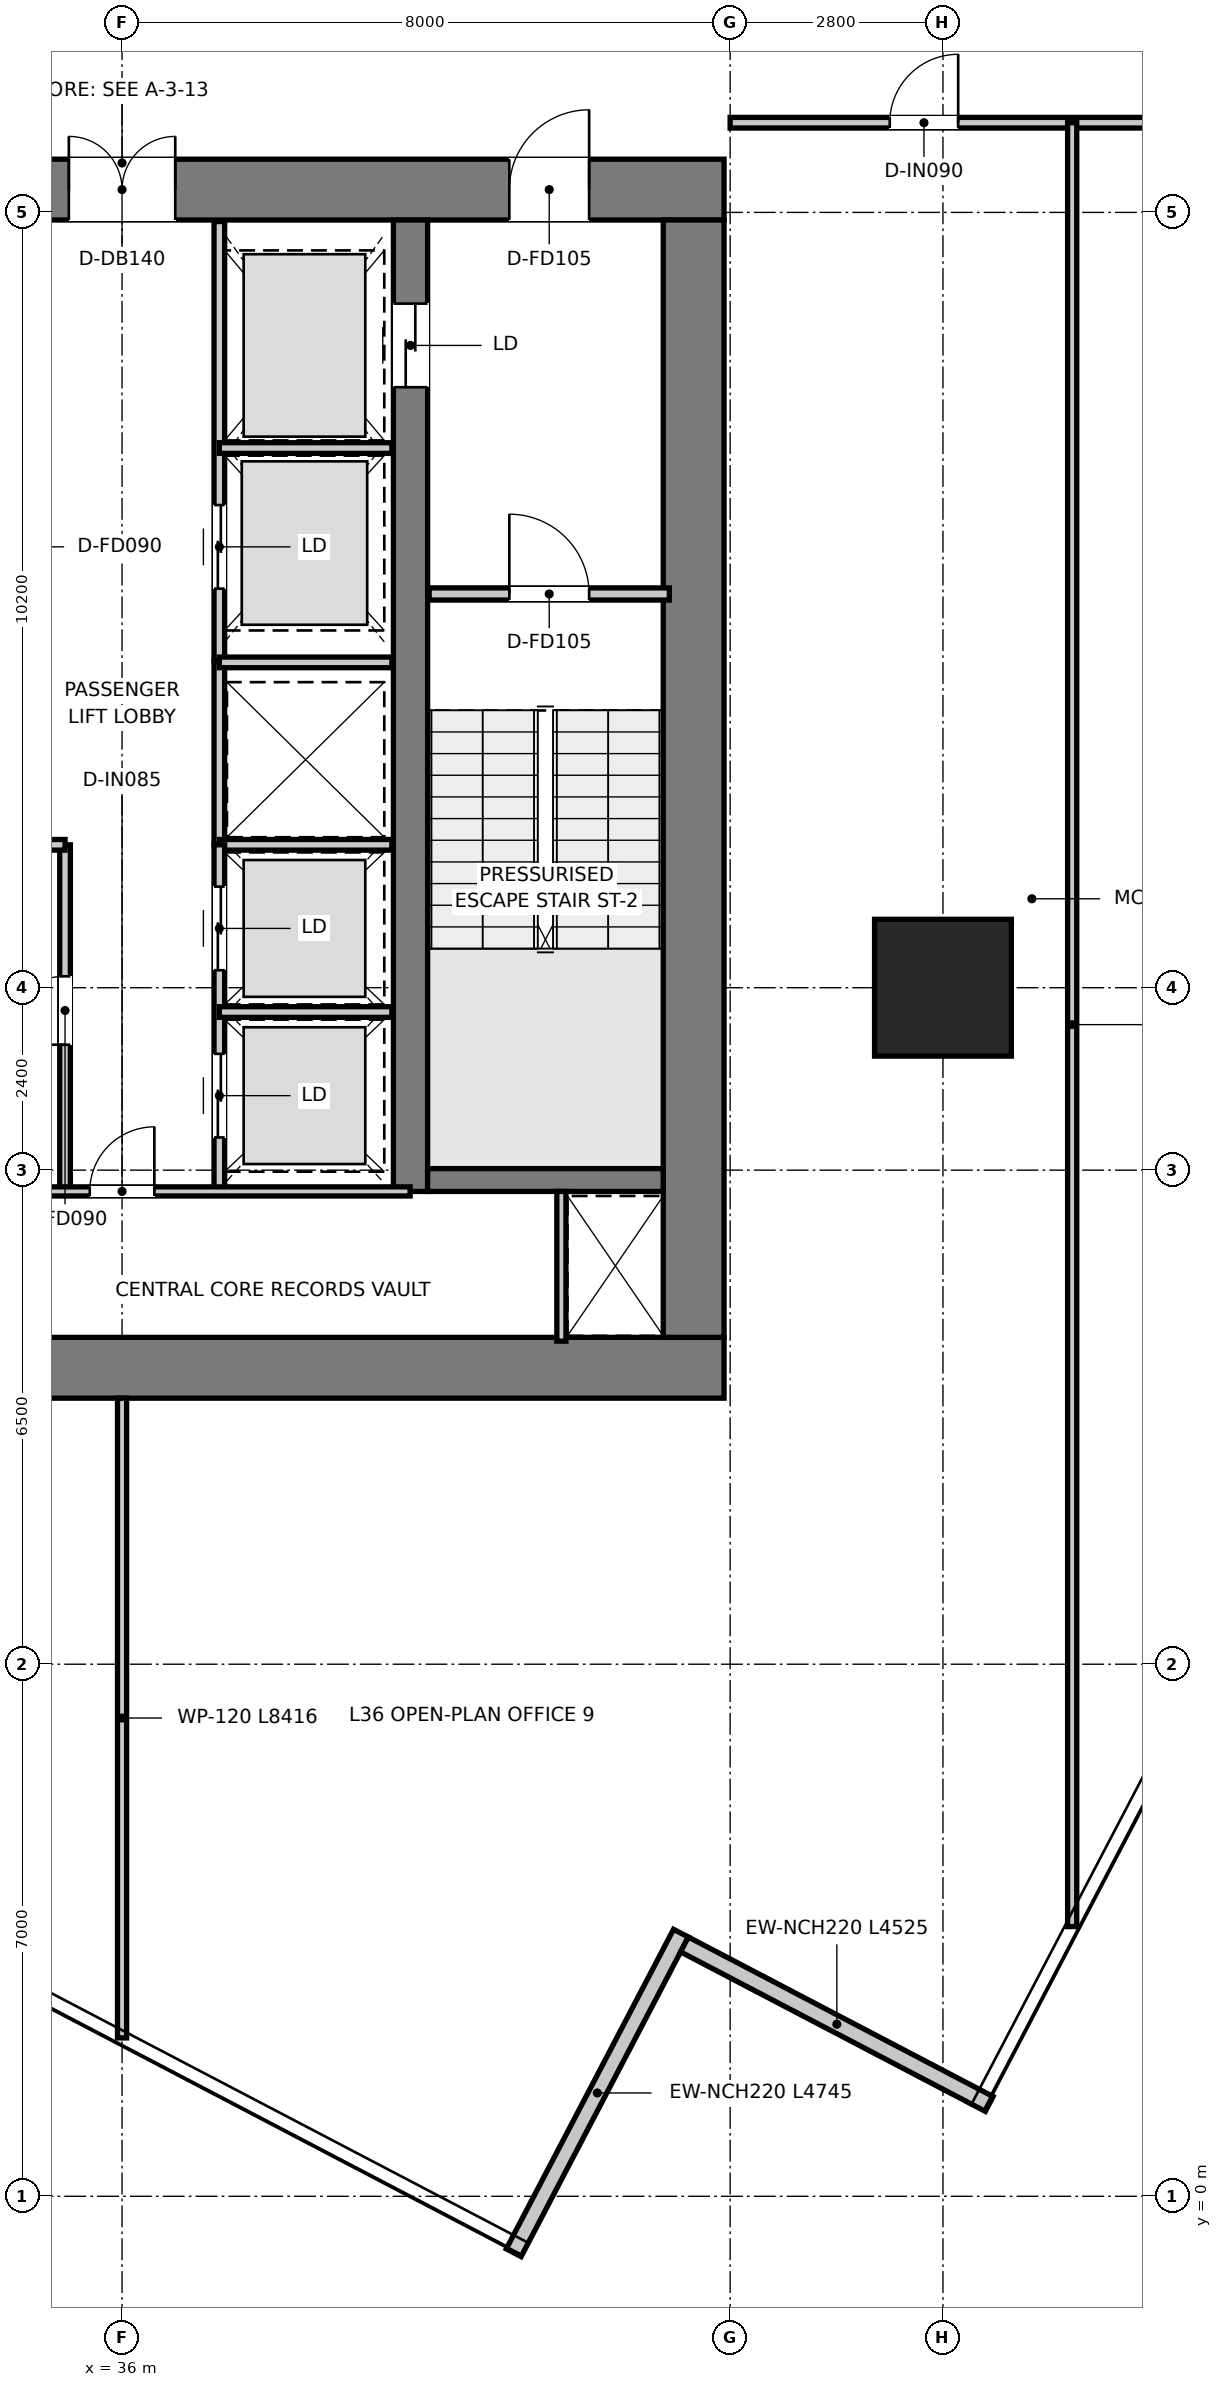
"""IFC4 building model, lengths in metres.
Left out: names, types, materials, properties, quantities, classifications, styles, units other than length and angle.
Written with IfcOpenShell. Run it as: python <this file> out.ifc"""

import sys

from ifc_helpers import new_model, si_unit, direction, frame, frame_2d, origin, origin_2d, place, context, subcontext, project, spatial, rectangle, extrude, source, transform, mapped, element, fill, save


model = new_model("IFC4")
c1 = context("Model", 3, precision=1e-05, world=origin(), true_north=direction((0.0, 1.0)))
c2 = subcontext(c1, "Body", "Model", "MODEL_VIEW")
j1 = project(units=[si_unit("LENGTHUNIT", "METRE"), si_unit("PLANEANGLEUNIT", "RADIAN")], contexts=[c1])
p1 = place(None, origin())
s1 = spatial("IfcSite", under=j1, at=p1, CompositionType="ELEMENT")
p2 = place(p1, origin())
s2 = spatial("IfcBuilding", under=s1, at=p2, CompositionType="ELEMENT")
p3 = place(p2, frame((0.0, 0.0, 150.15)))
s3 = spatial("IfcBuildingStorey", under=s2, at=p3, CompositionType="ELEMENT", Elevation=150.15)
p4 = place(p3, frame((28.08, 10.9, 0.0), z_axis=(0.0, 0.0, 1.0), x_axis=(1.0, 0.0, 0.0)))
e1 = element("IfcWall", 1, at=p4, inside=s3, PredefinedType="SHEAR", context=c2, shape_type="SweptSolid", body=[
    extrude(rectangle(XDim=15.84, YDim=0.8, at=frame_2d((7.92, 0.0))), origin(), (0.0, 0.0, 1.0), 3.95),
])
p5 = place(p3, frame((28.08, 26.4, 0.0), z_axis=(0.0, 0.0, 1.0), x_axis=(1.0, 0.0, 0.0)))
e2 = element("IfcWall", 2, at=p5, inside=s3, PredefinedType="SHEAR", context=c2, shape_type="SweptSolid", body=[
    extrude(rectangle(XDim=15.84, YDim=0.8, at=frame_2d((7.92, 0.0))), origin(), (0.0, 0.0, 1.0), 3.95),
])
p6 = place(p5, frame((7.22, 0.0, 0.0)))
e3 = element("IfcOpeningElement", 3, at=p6, cuts=e2, PredefinedType="OPENING", context=c2, shape_type="SweptSolid", body=[
    extrude(rectangle(XDim=1.4, YDim=2.2, at=frame_2d((0.7, 1.1))), frame((0.0, 0.41, 0.0), z_axis=(0.0, -1.0, 0.0), x_axis=(1.0, 0.0, 0.0)), (0.0, 0.0, 1.0), 0.82),
])
p7 = place(p5, frame((1.775, 0.0, 0.0)))
e4 = element("IfcOpeningElement", 4, at=p7, cuts=e2, PredefinedType="OPENING", context=c2, shape_type="SweptSolid", body=[
    extrude(rectangle(XDim=1.05, YDim=2.1, at=frame_2d((0.525, 1.05))), frame((0.0, 0.41, 0.0), z_axis=(0.0, -1.0, 0.0), x_axis=(1.0, 0.0, 0.0)), (0.0, 0.0, 1.0), 0.82),
])
p8 = place(p5, frame((13.015, 0.0, 0.0)))
e5 = element("IfcOpeningElement", 5, at=p8, cuts=e2, PredefinedType="OPENING", context=c2, shape_type="SweptSolid", body=[
    extrude(rectangle(XDim=1.05, YDim=2.1, at=frame_2d((0.525, 1.05))), frame((0.0, 0.41, 0.0), z_axis=(0.0, -1.0, 0.0), x_axis=(1.0, 0.0, 0.0)), (0.0, 0.0, 1.0), 0.82),
])
p9 = place(p3, frame((43.52, 11.3, 0.0), z_axis=(0.0, 0.0, 1.0), x_axis=(0.0, 1.0, 0.0)))
e6 = element("IfcWall", 6, at=p9, inside=s3, PredefinedType="SHEAR", context=c2, shape_type="SweptSolid", body=[
    extrude(rectangle(XDim=14.7, YDim=0.8, at=frame_2d((7.35, 0.0))), origin(), (0.0, 0.0, 1.0), 3.95),
])
p10 = place(p3, frame((39.795, 13.22, 0.0), z_axis=(0.0, 0.0, 1.0), x_axis=(0.0, 1.0, 0.0)))
e7 = element("IfcWall", 7, at=p10, inside=s3, PredefinedType="SHEAR", context=c2, shape_type="SweptSolid", body=[
    extrude(rectangle(XDim=12.78, YDim=0.45, at=frame_2d((6.39, 0.0))), origin(), (0.0, 0.0, 1.0), 3.95),
])
p11 = place(p10, frame((10.58, 0.0, 0.0)))
e8 = element("IfcOpeningElement", 8, at=p11, cuts=e7, PredefinedType="OPENING", context=c2, shape_type="SweptSolid", body=[
    extrude(rectangle(XDim=1.1, YDim=2.15, at=frame_2d((0.55, 1.075))), frame((0.0, 0.235, 0.0), z_axis=(0.0, -1.0, 0.0), x_axis=(1.0, 0.0, 0.0)), (0.0, 0.0, 1.0), 0.47),
])
p12 = place(p3, frame((40.02, 13.37, 0.0), z_axis=(0.0, 0.0, 1.0), x_axis=(1.0, 0.0, 0.0)))
e9 = element("IfcWall", 9, at=p12, inside=s3, PredefinedType="SHEAR", context=c2, shape_type="SweptSolid", body=[
    extrude(rectangle(XDim=3.1, YDim=0.3, at=frame_2d((1.55, 0.0))), origin(), (0.0, 0.0, 1.0), 3.95),
])
m1 = source(origin(), c2, "Body", "SweptSolid", [
    extrude(rectangle(XDim=1.8, YDim=1.8, at=origin_2d()), origin(), (0.0, 0.0, 1.0), 3.95),
])
p13 = place(p3, frame((46.8, 15.9, 0.0), z_axis=(0.0, 0.0, 1.0), x_axis=(1.0, 0.0, 0.0)))
e10 = element("IfcColumn", 10, at=p13, inside=s3, PredefinedType="USERDEFINED", context=c2, shape_type="MappedRepresentation", body=[
    mapped(m1, transform((0.0, 0.0, 0.0), x_axis=(1.0, 0.0, 0.0), y_axis=(0.0, 1.0, 0.0), z_axis=(0.0, 0.0, 1.0), scale=1.0)),
])
p14 = place(p3, frame((41.153, -0.743, 0.0), z_axis=(0.0, 0.0, 1.0), x_axis=(0.463643579795, 0.886021800474, 0.0)))
e11 = element("IfcWall", 11, at=p14, inside=s3, PredefinedType="ELEMENTEDWALL", context=c2, shape_type="SweptSolid", body=[
    extrude(rectangle(XDim=4.745, YDim=0.22, at=frame_2d((2.373, 0.0))), origin(), (0.0, 0.0, 1.0), 3.67),
])
p15 = place(p3, frame((43.399, 3.313, 0.0), z_axis=(0.0, 0.0, 1.0), x_axis=(0.885997280363, -0.463690434653, 0.0)))
e12 = element("IfcWall", 12, at=p15, inside=s3, PredefinedType="ELEMENTEDWALL", context=c2, shape_type="SweptSolid", body=[
    extrude(rectangle(XDim=4.525, YDim=0.22, at=frame_2d((2.262, 0.0))), origin(), (0.0, 0.0, 1.0), 3.67),
])
p16 = place(p3, frame((40.04, 21.08, 0.0), z_axis=(0.0, 0.0, 1.0), x_axis=(1.0, 0.0, 0.0)))
e13 = element("IfcWall", 13, at=p16, inside=s3, PredefinedType="PARTITIONING", context=c2, shape_type="SweptSolid", body=[
    extrude(rectangle(XDim=3.16, YDim=0.16, at=frame_2d((1.58, 0.0))), origin(), (0.0, 0.0, 1.0), 3.67),
])
p17 = place(p16, frame((1.055, 0.0, 0.0)))
e14 = element("IfcOpeningElement", 14, at=p17, cuts=e13, PredefinedType="OPENING", context=c2, shape_type="SweptSolid", body=[
    extrude(rectangle(XDim=1.05, YDim=2.1, at=frame_2d((0.525, 1.05))), frame((0.0, 0.09, 0.0), z_axis=(0.0, -1.0, 0.0), x_axis=(1.0, 0.0, 0.0)), (0.0, 0.0, 1.0), 0.18),
])
p18 = place(p3, frame((37.28, 20.2, 0.0), z_axis=(0.0, 0.0, 1.0), x_axis=(0.0, 1.0, 0.0)))
e15 = element("IfcWall", 15, at=p18, inside=s3, PredefinedType="PARTITIONING", context=c2, shape_type="SweptSolid", body=[
    extrude(rectangle(XDim=5.78, YDim=0.14, at=frame_2d((2.89, 0.0))), origin(), (0.0, 0.0, 1.0), 2.67),
])
p19 = place(p18, frame((0.95, 0.0, 0.0)))
e16 = element("IfcOpeningElement", 16, at=p19, cuts=e15, PredefinedType="OPENING", context=c2, shape_type="SweptSolid", body=[
    extrude(rectangle(XDim=1.1, YDim=2.15, at=frame_2d((0.55, 1.075))), frame((0.0, 0.08, 0.0), z_axis=(0.0, -1.0, 0.0), x_axis=(1.0, 0.0, 0.0)), (0.0, 0.0, 1.0), 0.16),
])
p20 = place(p3, frame((37.28, 23.0, 0.0), z_axis=(0.0, 0.0, 1.0), x_axis=(1.0, 0.0, 0.0)))
e17 = element("IfcWall", 17, at=p20, inside=s3, PredefinedType="PARTITIONING", context=c2, shape_type="SweptSolid", body=[
    extrude(rectangle(XDim=2.27, YDim=0.14, at=frame_2d((1.135, 0.0))), origin(), (0.0, 0.0, 1.0), 2.67),
])
p21 = place(p3, frame((37.28, 17.78, 0.0), z_axis=(0.0, 0.0, 1.0), x_axis=(0.0, 1.0, 0.0)))
e18 = element("IfcWall", 18, at=p21, inside=s3, PredefinedType="PARTITIONING", context=c2, shape_type="SweptSolid", body=[
    extrude(rectangle(XDim=2.42, YDim=0.14, at=frame_2d((1.21, 0.0))), origin(), (0.0, 0.0, 1.0), 3.67),
])
for number, where, z_axis, x_axis in (
    (19, (37.28, 17.78, 0.0), (0.0, 0.0, 1.0), (1.0, 0.0, 0.0)),
    (20, (37.28, 20.18, 0.0), (0.0, 0.0, 1.0), (1.0, 0.0, 0.0)),
):
    element("IfcWall", number, at=place(p3, frame(where, z_axis=z_axis, x_axis=x_axis)), inside=s3, PredefinedType="PARTITIONING", context=c2, shape_type="SweptSolid", body=[
        extrude(rectangle(XDim=2.27, YDim=0.14, at=frame_2d((1.135, 0.0))), origin(), (0.0, 0.0, 1.0), 3.67),
    ])
p22 = place(p3, frame((35.25, 13.22, 0.0), z_axis=(0.0, 0.0, 1.0), x_axis=(0.0, 1.0, 0.0)))
e21 = element("IfcWall", 21, at=p22, inside=s3, PredefinedType="PARTITIONING", context=c2, shape_type="SweptSolid", body=[
    extrude(rectangle(XDim=4.56, YDim=0.14, at=frame_2d((2.28, 0.0))), origin(), (0.0, 0.0, 1.0), 3.67),
])
p23 = place(p22, frame((1.93, 0.0, 0.0)))
e22 = element("IfcOpeningElement", 22, at=p23, cuts=e21, PredefinedType="OPENING", context=c2, shape_type="SweptSolid", body=[
    extrude(rectangle(XDim=0.9, YDim=2.1, at=frame_2d((0.45, 1.05))), frame((0.0, 0.08, 0.0), z_axis=(0.0, -1.0, 0.0), x_axis=(1.0, 0.0, 0.0)), (0.0, 0.0, 1.0), 0.16),
])
p24 = place(p3, frame((34.72, 17.78, 0.0), z_axis=(0.0, 0.0, 1.0), x_axis=(1.0, 0.0, 0.0)))
e23 = element("IfcWall", 23, at=p24, inside=s3, PredefinedType="PARTITIONING", context=c2, shape_type="SweptSolid", body=[
    extrude(rectangle(XDim=0.53, YDim=0.14, at=frame_2d((0.265, 0.0))), origin(), (0.0, 0.0, 1.0), 3.67),
])
p25 = place(p3, frame((37.28, 13.22, 0.0), z_axis=(0.0, 0.0, 1.0), x_axis=(0.0, 1.0, 0.0)))
e24 = element("IfcWall", 24, at=p25, inside=s3, PredefinedType="PARTITIONING", context=c2, shape_type="SweptSolid", body=[
    extrude(rectangle(XDim=4.56, YDim=0.14, at=frame_2d((2.28, 0.0))), origin(), (0.0, 0.0, 1.0), 3.67),
])
p26 = place(p25, frame((0.71, 0.0, 0.0)))
e25 = element("IfcOpeningElement", 25, at=p26, cuts=e24, PredefinedType="OPENING", context=c2, shape_type="SweptSolid", body=[
    extrude(rectangle(XDim=1.1, YDim=2.15, at=frame_2d((0.55, 1.075))), frame((0.0, 0.08, 0.0), z_axis=(0.0, -1.0, 0.0), x_axis=(1.0, 0.0, 0.0)), (0.0, 0.0, 1.0), 0.16),
])
p27 = place(p25, frame((2.91, 0.0, 0.0)))
e26 = element("IfcOpeningElement", 26, at=p27, cuts=e24, PredefinedType="OPENING", context=c2, shape_type="SweptSolid", body=[
    extrude(rectangle(XDim=1.1, YDim=2.15, at=frame_2d((0.55, 1.075))), frame((0.0, 0.08, 0.0), z_axis=(0.0, -1.0, 0.0), x_axis=(1.0, 0.0, 0.0)), (0.0, 0.0, 1.0), 0.16),
])
p28 = place(p3, frame((37.28, 15.58, 0.0), z_axis=(0.0, 0.0, 1.0), x_axis=(1.0, 0.0, 0.0)))
e27 = element("IfcWall", 27, at=p28, inside=s3, PredefinedType="PARTITIONING", context=c2, shape_type="SweptSolid", body=[
    extrude(rectangle(XDim=2.27, YDim=0.14, at=frame_2d((1.135, 0.0))), origin(), (0.0, 0.0, 1.0), 3.67),
])
p29 = place(p3, frame((41.78, 11.25, 0.0), z_axis=(0.0, 0.0, 1.0), x_axis=(0.0, 1.0, 0.0)))
e28 = element("IfcWall", 28, at=p29, inside=s3, PredefinedType="PARTITIONING", context=c2, shape_type="SweptSolid", body=[
    extrude(rectangle(XDim=1.97, YDim=0.12, at=frame_2d((0.985, 0.0))), origin(), (0.0, 0.0, 1.0), 3.67),
])
p30 = place(p3, frame((32.21, 13.22, 0.0), z_axis=(0.0, 0.0, 1.0), x_axis=(1.0, 0.0, 0.0)))
e29 = element("IfcWall", 29, at=p30, inside=s3, PredefinedType="PARTITIONING", context=c2, shape_type="SweptSolid", body=[
    extrude(rectangle(XDim=7.58, YDim=0.12, at=frame_2d((3.79, 0.0))), origin(), (0.0, 0.0, 1.0), 3.67),
])
p31 = place(p30, frame((3.365, 0.0, 0.0)))
e30 = element("IfcOpeningElement", 30, at=p31, cuts=e29, PredefinedType="OPENING", context=c2, shape_type="SweptSolid", body=[
    extrude(rectangle(XDim=0.85, YDim=2.1, at=frame_2d((0.425, 1.05))), frame((0.0, 0.07, 0.0), z_axis=(0.0, -1.0, 0.0), x_axis=(1.0, 0.0, 0.0)), (0.0, 0.0, 1.0), 0.14),
])
p32 = place(p3, frame((44.0, 27.28, 0.0), z_axis=(0.0, 0.0, 1.0), x_axis=(1.0, 0.0, 0.0)))
e31 = element("IfcWall", 31, at=p32, inside=s3, PredefinedType="PARTITIONING", context=c2, shape_type="SweptSolid", body=[
    extrude(rectangle(XDim=16.92, YDim=0.14, at=frame_2d((8.46, 0.0))), origin(), (0.0, 0.0, 1.0), 3.03),
])
p33 = place(p32, frame((2.1, 0.0, 0.0)))
e32 = element("IfcOpeningElement", 32, at=p33, cuts=e31, PredefinedType="OPENING", context=c2, shape_type="SweptSolid", body=[
    extrude(rectangle(XDim=0.9, YDim=2.1, at=frame_2d((0.45, 1.05))), frame((0.0, 0.08, 0.0), z_axis=(0.0, -1.0, 0.0), x_axis=(1.0, 0.0, 0.0)), (0.0, 0.0, 1.0), 0.16),
])
p34 = place(p32, frame((10.987, 0.0, 0.0)))
e33 = element("IfcOpeningElement", 33, at=p34, cuts=e31, PredefinedType="OPENING", context=c2, shape_type="SweptSolid", body=[
    extrude(rectangle(XDim=0.9, YDim=2.1, at=frame_2d((0.45, 1.05))), frame((0.0, 0.08, 0.0), z_axis=(0.0, -1.0, 0.0), x_axis=(1.0, 0.0, 0.0)), (0.0, 0.0, 1.0), 0.16),
])
p35 = place(p3, frame((36.0, 2.084, 0.0), z_axis=(0.0, 0.0, 1.0), x_axis=(0.0, 1.0, 0.0)))
e34 = element("IfcWall", 34, at=p35, inside=s3, PredefinedType="PARTITIONING", context=c2, shape_type="SweptSolid", body=[
    extrude(rectangle(XDim=8.416, YDim=0.12, at=frame_2d((4.208, 0.0))), origin(), (0.0, 0.0, 1.0), 3.67),
])
p36 = place(p3, frame((48.5, 3.548, 0.0), z_axis=(0.0, 0.0, 1.0), x_axis=(0.0, 1.0, 0.0)))
e35 = element("IfcWall", 35, at=p36, inside=s3, PredefinedType="PARTITIONING", context=c2, shape_type="SweptSolid", body=[
    extrude(rectangle(XDim=23.732, YDim=0.12, at=frame_2d((11.866, 0.0))), origin(), (0.0, 0.0, 1.0), 3.08),
])
p37 = place(p17, origin())
e36 = element("IfcDoor", 36, at=p37, inside=s3, OperationType="SINGLE_SWING_LEFT", PredefinedType="DOOR", context=c2, shape_type="SweptSolid", body=[
    extrude(rectangle(XDim=1.05, YDim=2.1, at=frame_2d((0.525, 1.05))), frame((0.0, 0.025, 0.0), z_axis=(0.0, -1.0, 0.0), x_axis=(1.0, 0.0, 0.0)), (0.0, 0.0, 1.0), 0.05),
])
fill(e14, e36)
p38 = place(p6, origin())
e37 = element("IfcDoor", 37, at=p38, inside=s3, OperationType="DOUBLE_DOOR_SINGLE_SWING", PredefinedType="DOOR", context=c2, shape_type="SweptSolid", body=[
    extrude(rectangle(XDim=1.4, YDim=2.2, at=frame_2d((0.7, 1.1))), frame((0.0, 0.025, 0.0), z_axis=(0.0, -1.0, 0.0), x_axis=(1.0, 0.0, 0.0)), (0.0, 0.0, 1.0), 0.05),
])
fill(e3, e37)
p39 = place(p8, origin())
e38 = element("IfcDoor", 38, at=p39, inside=s3, OperationType="SINGLE_SWING_RIGHT", PredefinedType="DOOR", context=c2, shape_type="SweptSolid", body=[
    extrude(rectangle(XDim=1.05, YDim=2.1, at=frame_2d((0.525, 1.05))), frame((0.0, 0.025, 0.0), z_axis=(0.0, -1.0, 0.0), x_axis=(1.0, 0.0, 0.0)), (0.0, 0.0, 1.0), 0.05),
])
fill(e5, e38)
p40 = place(p11, origin())
e39 = element("IfcDoor", 39, at=p40, inside=s3, OperationType="DOUBLE_DOOR_SLIDING", PredefinedType="DOOR", context=c2, shape_type="SweptSolid", body=[
    extrude(rectangle(XDim=1.1, YDim=2.15, at=frame_2d((0.55, 1.075))), frame((0.0, 0.025, 0.0), z_axis=(0.0, -1.0, 0.0), x_axis=(1.0, 0.0, 0.0)), (0.0, 0.0, 1.0), 0.05),
])
fill(e8, e39)
p41 = place(p19, origin())
e40 = element("IfcDoor", 40, at=p41, inside=s3, OperationType="DOUBLE_DOOR_SLIDING", PredefinedType="DOOR", context=c2, shape_type="SweptSolid", body=[
    extrude(rectangle(XDim=1.1, YDim=2.15, at=frame_2d((0.55, 1.075))), frame((0.0, 0.025, 0.0), z_axis=(0.0, -1.0, 0.0), x_axis=(1.0, 0.0, 0.0)), (0.0, 0.0, 1.0), 0.05),
])
fill(e16, e40)
p42 = place(p23, origin())
e41 = element("IfcDoor", 41, at=p42, inside=s3, OperationType="SINGLE_SWING_LEFT", PredefinedType="DOOR", context=c2, shape_type="SweptSolid", body=[
    extrude(rectangle(XDim=0.9, YDim=2.1, at=frame_2d((0.45, 1.05))), frame((0.0, 0.025, 0.0), z_axis=(0.0, -1.0, 0.0), x_axis=(1.0, 0.0, 0.0)), (0.0, 0.0, 1.0), 0.05),
])
fill(e22, e41)
p43 = place(p26, origin())
e42 = element("IfcDoor", 42, at=p43, inside=s3, OperationType="DOUBLE_DOOR_SLIDING", PredefinedType="DOOR", context=c2, shape_type="SweptSolid", body=[
    extrude(rectangle(XDim=1.1, YDim=2.15, at=frame_2d((0.55, 1.075))), frame((0.0, 0.025, 0.0), z_axis=(0.0, -1.0, 0.0), x_axis=(1.0, 0.0, 0.0)), (0.0, 0.0, 1.0), 0.05),
])
fill(e25, e42)
p44 = place(p27, origin())
e43 = element("IfcDoor", 43, at=p44, inside=s3, OperationType="DOUBLE_DOOR_SLIDING", PredefinedType="DOOR", context=c2, shape_type="SweptSolid", body=[
    extrude(rectangle(XDim=1.1, YDim=2.15, at=frame_2d((0.55, 1.075))), frame((0.0, 0.025, 0.0), z_axis=(0.0, -1.0, 0.0), x_axis=(1.0, 0.0, 0.0)), (0.0, 0.0, 1.0), 0.05),
])
fill(e26, e43)
p45 = place(p31, origin())
e44 = element("IfcDoor", 44, at=p45, inside=s3, OperationType="SINGLE_SWING_RIGHT", PredefinedType="DOOR", context=c2, shape_type="SweptSolid", body=[
    extrude(rectangle(XDim=0.85, YDim=2.1, at=frame_2d((0.425, 1.05))), frame((0.0, 0.025, 0.0), z_axis=(0.0, -1.0, 0.0), x_axis=(1.0, 0.0, 0.0)), (0.0, 0.0, 1.0), 0.05),
])
fill(e30, e44)
p46 = place(p33, origin())
e45 = element("IfcDoor", 45, at=p46, inside=s3, OperationType="SINGLE_SWING_RIGHT", PredefinedType="DOOR", context=c2, shape_type="SweptSolid", body=[
    extrude(rectangle(XDim=0.9, YDim=2.1, at=frame_2d((0.45, 1.05))), frame((0.0, 0.025, 0.0), z_axis=(0.0, -1.0, 0.0), x_axis=(1.0, 0.0, 0.0)), (0.0, 0.0, 1.0), 0.05),
])
fill(e32, e45)
save(model, sys.argv[1])
